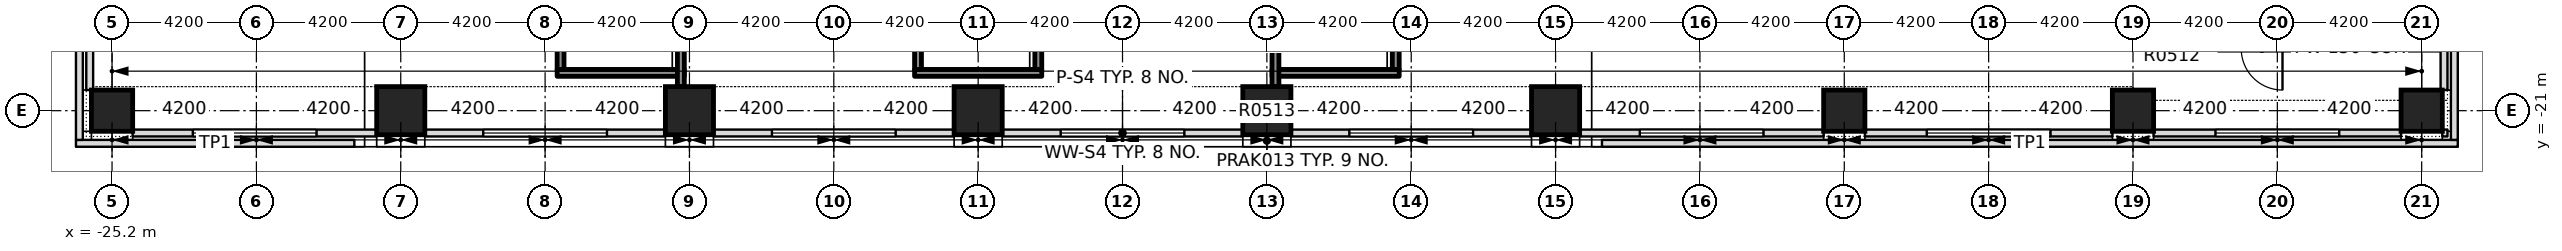
"""IFC4 building model, lengths in metres.
Left out: names, types, materials, properties, quantities, classifications, styles, units other than length and angle.
Written with IfcOpenShell. Run it as: python <this file> out.ifc"""

import sys

from ifc_helpers import new_model, si_unit, direction, frame, frame_2d, origin, origin_2d, place, context, subcontext, project, spatial, rectangle, extrude, element, fill, save


model = new_model("IFC4")
c1 = context("Model", 3, precision=1e-05, world=origin(), true_north=direction((0.0, 1.0)))
c2 = subcontext(c1, "Body", "Model", "MODEL_VIEW")
j1 = project(units=[si_unit("LENGTHUNIT", "METRE"), si_unit("PLANEANGLEUNIT", "RADIAN")], contexts=[c1])
p1 = place(None, origin())
s1 = spatial("IfcSite", under=j1, at=p1, CompositionType="ELEMENT")
p2 = place(p1, origin())
s2 = spatial("IfcBuilding", under=s1, at=p2, CompositionType="ELEMENT")
p3 = place(p2, frame((0.0, 0.0, 30.0)))
s3 = spatial("IfcBuildingStorey", under=s2, at=p3, CompositionType="ELEMENT", Elevation=30.0)
for number, where, z_axis, x_axis in (
    (1, (-16.8, -21.0, -0.4), (0.0, 0.0, 1.0), (1.0, 0.0, 0.0)),
    (2, (-8.4, -21.0, -0.4), (0.0, 0.0, 1.0), (1.0, 0.0, 0.0)),
    (3, (0.0, -21.0, -0.4), (0.0, 0.0, 1.0), (1.0, 0.0, 0.0)),
    (4, (8.4, -21.0, -0.4), (0.0, 0.0, 1.0), (1.0, 0.0, 0.0)),
    (5, (16.8, -21.0, -0.4), (0.0, 0.0, 1.0), (1.0, 0.0, 0.0)),
):
    element("IfcColumn", number, at=place(p3, frame(where, z_axis=z_axis, x_axis=x_axis)), inside=s3, PredefinedType="COLUMN", context=c2, shape_type="SweptSolid", body=[
        extrude(rectangle(XDim=1.4, YDim=1.4, at=origin_2d()), origin(), (0.0, 0.0, 1.0), 4.58),
    ])
for number, where, z_axis, x_axis in (
    (6, (-25.2, -21.0, 0.0), (0.0, 0.0, 1.0), (1.0, 0.0, 0.0)),
    (7, (25.2, -21.0, 0.0), (0.0, 0.0, 1.0), (1.0, 0.0, 0.0)),
    (8, (33.6, -21.0, 0.0), (0.0, 0.0, 1.0), (1.0, 0.0, 0.0)),
    (9, (42.0, -21.0, 0.0), (0.0, 0.0, 1.0), (1.0, 0.0, 0.0)),
):
    element("IfcColumn", number, at=place(p3, frame(where, z_axis=z_axis, x_axis=x_axis)), inside=s3, PredefinedType="COLUMN", context=c2, shape_type="SweptSolid", body=[
        extrude(rectangle(XDim=1.2, YDim=1.2, at=origin_2d()), origin(), (0.0, 0.0, 1.0), 4.18),
    ])
p4 = place(p3, frame((-26.25, -21.95, 4.5), z_axis=(0.0, 0.0, 1.0), x_axis=(1.0, 0.0, 0.0)))
e10 = element("IfcWall", 10, at=p4, inside=s3, PredefinedType="PARAPET", context=c2, shape_type="SweptSolid", body=[
    extrude(rectangle(XDim=8.1, YDim=0.2, at=frame_2d((4.05, 0.0))), origin(), (0.0, 0.0, 1.0), 1.2),
])
p5 = place(p3, frame((-26.15, -21.85, 4.5), z_axis=(0.0, 0.0, 1.0), x_axis=(0.0, 1.0, 0.0)))
e11 = element("IfcWall", 11, at=p5, inside=s3, PredefinedType="PARAPET", context=c2, shape_type="SweptSolid", body=[
    extrude(rectangle(XDim=7.9, YDim=0.2, at=frame_2d((3.95, 0.0))), origin(), (0.0, 0.0, 1.0), 1.2),
])
p6 = place(p3, frame((18.15, -21.95, 4.5), z_axis=(0.0, 0.0, 1.0), x_axis=(1.0, 0.0, 0.0)))
e12 = element("IfcWall", 12, at=p6, inside=s3, PredefinedType="PARAPET", context=c2, shape_type="SweptSolid", body=[
    extrude(rectangle(XDim=24.9, YDim=0.2, at=frame_2d((12.45, 0.0))), origin(), (0.0, 0.0, 1.0), 1.2),
])
p7 = place(p3, frame((42.95, -21.85, 4.5), z_axis=(0.0, 0.0, 1.0), x_axis=(0.0, 1.0, 0.0)))
e13 = element("IfcWall", 13, at=p7, inside=s3, PredefinedType="PARAPET", context=c2, shape_type="SweptSolid", body=[
    extrude(rectangle(XDim=52.1, YDim=0.2, at=frame_2d((26.05, 0.0))), origin(), (0.0, 0.0, 1.0), 1.2),
])
p8 = place(p3, frame((-24.6, -21.65, 0.0), z_axis=(0.0, 0.0, 1.0), x_axis=(1.0, 0.0, 0.0)))
e14 = element("IfcWall", 14, at=p8, inside=s3, PredefinedType="STANDARD", context=c2, shape_type="SweptSolid", body=[
    extrude(rectangle(XDim=7.1, YDim=0.2, at=frame_2d((3.55, 0.0))), origin(), (0.0, 0.0, 1.0), 4.18),
])
p9 = place(p8, frame((1.75, 0.0, 0.9)))
e15 = element("IfcOpeningElement", 15, at=p9, cuts=e14, PredefinedType="OPENING", context=c2, shape_type="SweptSolid", body=[
    extrude(rectangle(XDim=3.6, YDim=2.4, at=frame_2d((1.8, 1.2))), frame((0.0, 0.11, 0.0), z_axis=(0.0, -1.0, 0.0), x_axis=(1.0, 0.0, 0.0)), (0.0, 0.0, 1.0), 0.22),
])
p10 = place(p3, frame((-16.1, -21.65, 0.0), z_axis=(0.0, 0.0, 1.0), x_axis=(1.0, 0.0, 0.0)))
e16 = element("IfcWall", 16, at=p10, inside=s3, PredefinedType="STANDARD", context=c2, shape_type="SweptSolid", body=[
    extrude(rectangle(XDim=7.0, YDim=0.2, at=frame_2d((3.5, 0.0))), origin(), (0.0, 0.0, 1.0), 4.18),
])
p11 = place(p10, frame((1.7, 0.0, 0.9)))
e17 = element("IfcOpeningElement", 17, at=p11, cuts=e16, PredefinedType="OPENING", context=c2, shape_type="SweptSolid", body=[
    extrude(rectangle(XDim=3.6, YDim=2.4, at=frame_2d((1.8, 1.2))), frame((0.0, 0.11, 0.0), z_axis=(0.0, -1.0, 0.0), x_axis=(1.0, 0.0, 0.0)), (0.0, 0.0, 1.0), 0.22),
])
p12 = place(p3, frame((-7.7, -21.65, 0.0), z_axis=(0.0, 0.0, 1.0), x_axis=(1.0, 0.0, 0.0)))
e18 = element("IfcWall", 18, at=p12, inside=s3, PredefinedType="STANDARD", context=c2, shape_type="SweptSolid", body=[
    extrude(rectangle(XDim=7.0, YDim=0.2, at=frame_2d((3.5, 0.0))), origin(), (0.0, 0.0, 1.0), 4.18),
])
p13 = place(p12, frame((1.7, 0.0, 0.9)))
e19 = element("IfcOpeningElement", 19, at=p13, cuts=e18, PredefinedType="OPENING", context=c2, shape_type="SweptSolid", body=[
    extrude(rectangle(XDim=3.6, YDim=2.4, at=frame_2d((1.8, 1.2))), frame((0.0, 0.11, 0.0), z_axis=(0.0, -1.0, 0.0), x_axis=(1.0, 0.0, 0.0)), (0.0, 0.0, 1.0), 0.22),
])
p14 = place(p3, frame((0.7, -21.65, 0.0), z_axis=(0.0, 0.0, 1.0), x_axis=(1.0, 0.0, 0.0)))
e20 = element("IfcWall", 20, at=p14, inside=s3, PredefinedType="STANDARD", context=c2, shape_type="SweptSolid", body=[
    extrude(rectangle(XDim=7.0, YDim=0.2, at=frame_2d((3.5, 0.0))), origin(), (0.0, 0.0, 1.0), 4.18),
])
p15 = place(p14, frame((1.7, 0.0, 0.9)))
e21 = element("IfcOpeningElement", 21, at=p15, cuts=e20, PredefinedType="OPENING", context=c2, shape_type="SweptSolid", body=[
    extrude(rectangle(XDim=3.6, YDim=2.4, at=frame_2d((1.8, 1.2))), frame((0.0, 0.11, 0.0), z_axis=(0.0, -1.0, 0.0), x_axis=(1.0, 0.0, 0.0)), (0.0, 0.0, 1.0), 0.22),
])
p16 = place(p3, frame((9.1, -21.65, 0.0), z_axis=(0.0, 0.0, 1.0), x_axis=(1.0, 0.0, 0.0)))
e22 = element("IfcWall", 22, at=p16, inside=s3, PredefinedType="STANDARD", context=c2, shape_type="SweptSolid", body=[
    extrude(rectangle(XDim=7.0, YDim=0.2, at=frame_2d((3.5, 0.0))), origin(), (0.0, 0.0, 1.0), 4.18),
])
p17 = place(p16, frame((1.7, 0.0, 0.9)))
e23 = element("IfcOpeningElement", 23, at=p17, cuts=e22, PredefinedType="OPENING", context=c2, shape_type="SweptSolid", body=[
    extrude(rectangle(XDim=3.6, YDim=2.4, at=frame_2d((1.8, 1.2))), frame((0.0, 0.11, 0.0), z_axis=(0.0, -1.0, 0.0), x_axis=(1.0, 0.0, 0.0)), (0.0, 0.0, 1.0), 0.22),
])
p18 = place(p3, frame((17.5, -21.65, 0.0), z_axis=(0.0, 0.0, 1.0), x_axis=(1.0, 0.0, 0.0)))
e24 = element("IfcWall", 24, at=p18, inside=s3, PredefinedType="STANDARD", context=c2, shape_type="SweptSolid", body=[
    extrude(rectangle(XDim=7.1, YDim=0.2, at=frame_2d((3.55, 0.0))), origin(), (0.0, 0.0, 1.0), 4.18),
])
p19 = place(p18, frame((1.75, 0.0, 0.9)))
e25 = element("IfcOpeningElement", 25, at=p19, cuts=e24, PredefinedType="OPENING", context=c2, shape_type="SweptSolid", body=[
    extrude(rectangle(XDim=3.6, YDim=2.4, at=frame_2d((1.8, 1.2))), frame((0.0, 0.11, 0.0), z_axis=(0.0, -1.0, 0.0), x_axis=(1.0, 0.0, 0.0)), (0.0, 0.0, 1.0), 0.22),
])
p20 = place(p3, frame((25.8, -21.65, 0.0), z_axis=(0.0, 0.0, 1.0), x_axis=(1.0, 0.0, 0.0)))
e26 = element("IfcWall", 26, at=p20, inside=s3, PredefinedType="STANDARD", context=c2, shape_type="SweptSolid", body=[
    extrude(rectangle(XDim=7.2, YDim=0.2, at=frame_2d((3.6, 0.0))), origin(), (0.0, 0.0, 1.0), 4.18),
])
p21 = place(p20, frame((1.8, 0.0, 0.9)))
e27 = element("IfcOpeningElement", 27, at=p21, cuts=e26, PredefinedType="OPENING", context=c2, shape_type="SweptSolid", body=[
    extrude(rectangle(XDim=3.6, YDim=2.4, at=frame_2d((1.8, 1.2))), frame((0.0, 0.11, 0.0), z_axis=(0.0, -1.0, 0.0), x_axis=(1.0, 0.0, 0.0)), (0.0, 0.0, 1.0), 0.22),
])
p22 = place(p3, frame((34.2, -21.65, 0.0), z_axis=(0.0, 0.0, 1.0), x_axis=(1.0, 0.0, 0.0)))
e28 = element("IfcWall", 28, at=p22, inside=s3, PredefinedType="STANDARD", context=c2, shape_type="SweptSolid", body=[
    extrude(rectangle(XDim=7.2, YDim=0.2, at=frame_2d((3.6, 0.0))), origin(), (0.0, 0.0, 1.0), 4.18),
])
p23 = place(p22, frame((1.8, 0.0, 0.9)))
e29 = element("IfcOpeningElement", 29, at=p23, cuts=e28, PredefinedType="OPENING", context=c2, shape_type="SweptSolid", body=[
    extrude(rectangle(XDim=3.6, YDim=2.4, at=frame_2d((1.8, 1.2))), frame((0.0, 0.11, 0.0), z_axis=(0.0, -1.0, 0.0), x_axis=(1.0, 0.0, 0.0)), (0.0, 0.0, 1.0), 0.22),
])
p24 = place(p3, frame((42.6, -21.65, 0.0), z_axis=(0.0, 0.0, 1.0), x_axis=(1.0, 0.0, 0.0)))
e30 = element("IfcWall", 30, at=p24, inside=s3, PredefinedType="STANDARD", context=c2, shape_type="SweptSolid", body=[
    extrude(rectangle(XDim=0.15, YDim=0.2, at=frame_2d((0.075, 0.0))), origin(), (0.0, 0.0, 1.0), 4.18),
])
p25 = place(p3, frame((42.65, -20.4, 0.0), z_axis=(0.0, 0.0, 1.0), x_axis=(0.0, 1.0, 0.0)))
e31 = element("IfcWall", 31, at=p25, inside=s3, PredefinedType="STANDARD", context=c2, shape_type="SweptSolid", body=[
    extrude(rectangle(XDim=7.2, YDim=0.2, at=frame_2d((3.6, 0.0))), origin(), (0.0, 0.0, 1.0), 4.18),
])
p26 = place(p25, frame((1.8, 0.0, 0.9)))
e32 = element("IfcOpeningElement", 32, at=p26, cuts=e31, PredefinedType="OPENING", context=c2, shape_type="SweptSolid", body=[
    extrude(rectangle(XDim=3.6, YDim=2.4, at=frame_2d((1.8, 1.2))), frame((0.0, 0.11, 0.0), z_axis=(0.0, -1.0, 0.0), x_axis=(1.0, 0.0, 0.0)), (0.0, 0.0, 1.0), 0.22),
])
p27 = place(p3, frame((-25.85, -13.3, 0.0), z_axis=(0.0, 0.0, 1.0), x_axis=(0.0, -1.0, 0.0)))
e33 = element("IfcWall", 33, at=p27, inside=s3, PredefinedType="STANDARD", context=c2, shape_type="SweptSolid", body=[
    extrude(rectangle(XDim=7.1, YDim=0.2, at=frame_2d((3.55, 0.0))), origin(), (0.0, 0.0, 1.0), 4.18),
])
p28 = place(p27, frame((1.75, 0.0, 0.9)))
e34 = element("IfcOpeningElement", 34, at=p28, cuts=e33, PredefinedType="OPENING", context=c2, shape_type="SweptSolid", body=[
    extrude(rectangle(XDim=3.6, YDim=2.4, at=frame_2d((1.8, 1.2))), frame((0.0, 0.11, 0.0), z_axis=(0.0, -1.0, 0.0), x_axis=(1.0, 0.0, 0.0)), (0.0, 0.0, 1.0), 0.22),
])
p29 = place(p3, frame((-12.25, -19.9, 0.0), z_axis=(0.0, 0.0, 1.0), x_axis=(1.0, 0.0, 0.0)))
e35 = element("IfcWall", 35, at=p29, inside=s3, PredefinedType="SOLIDWALL", context=c2, shape_type="SweptSolid", body=[
    extrude(rectangle(XDim=3.7, YDim=0.2, at=frame_2d((1.85, 0.0))), origin(), (0.0, 0.0, 1.0), 4.18),
])
p30 = place(p3, frame((-12.15, -19.8, 0.0), z_axis=(0.0, 0.0, 1.0), x_axis=(0.0, 1.0, 0.0)))
e36 = element("IfcWall", 36, at=p30, inside=s3, PredefinedType="SOLIDWALL", context=c2, shape_type="SweptSolid", body=[
    extrude(rectangle(XDim=6.6, YDim=0.2, at=frame_2d((3.3, 0.0))), origin(), (0.0, 0.0, 1.0), 4.18),
])
p31 = place(p3, frame((-8.65, -20.3, 0.0), z_axis=(0.0, 0.0, 1.0), x_axis=(0.0, 1.0, 0.0)))
e37 = element("IfcWall", 37, at=p31, inside=s3, PredefinedType="SOLIDWALL", context=c2, shape_type="SweptSolid", body=[
    extrude(rectangle(XDim=7.1, YDim=0.2, at=frame_2d((3.55, 0.0))), origin(), (0.0, 0.0, 1.0), 4.18),
])
p32 = place(p3, frame((-1.85, -19.9, 0.0), z_axis=(0.0, 0.0, 1.0), x_axis=(1.0, 0.0, 0.0)))
e38 = element("IfcWall", 38, at=p32, inside=s3, PredefinedType="SOLIDWALL", context=c2, shape_type="SweptSolid", body=[
    extrude(rectangle(XDim=3.7, YDim=0.2, at=frame_2d((1.85, 0.0))), origin(), (0.0, 0.0, 1.0), 4.18),
])
for number, where, z_axis, x_axis in (
    (39, (-1.75, -19.8, 0.0), (0.0, 0.0, 1.0), (0.0, 1.0, 0.0)),
    (40, (1.75, -19.8, 0.0), (0.0, 0.0, 1.0), (0.0, 1.0, 0.0)),
):
    element("IfcWall", number, at=place(p3, frame(where, z_axis=z_axis, x_axis=x_axis)), inside=s3, PredefinedType="SOLIDWALL", context=c2, shape_type="SweptSolid", body=[
        extrude(rectangle(XDim=6.6, YDim=0.2, at=frame_2d((3.3, 0.0))), origin(), (0.0, 0.0, 1.0), 4.18),
    ])
p33 = place(p3, frame((8.55, -19.9, 0.0), z_axis=(0.0, 0.0, 1.0), x_axis=(1.0, 0.0, 0.0)))
e41 = element("IfcWall", 41, at=p33, inside=s3, PredefinedType="SOLIDWALL", context=c2, shape_type="SweptSolid", body=[
    extrude(rectangle(XDim=3.7, YDim=0.2, at=frame_2d((1.85, 0.0))), origin(), (0.0, 0.0, 1.0), 4.18),
])
p34 = place(p3, frame((8.65, -20.3, 0.0), z_axis=(0.0, 0.0, 1.0), x_axis=(0.0, 1.0, 0.0)))
e42 = element("IfcWall", 42, at=p34, inside=s3, PredefinedType="SOLIDWALL", context=c2, shape_type="SweptSolid", body=[
    extrude(rectangle(XDim=7.1, YDim=0.2, at=frame_2d((3.55, 0.0))), origin(), (0.0, 0.0, 1.0), 4.18),
])
p35 = place(p3, frame((12.15, -19.8, 0.0), z_axis=(0.0, 0.0, 1.0), x_axis=(0.0, 1.0, 0.0)))
e43 = element("IfcWall", 43, at=p35, inside=s3, PredefinedType="SOLIDWALL", context=c2, shape_type="SweptSolid", body=[
    extrude(rectangle(XDim=6.6, YDim=0.2, at=frame_2d((3.3, 0.0))), origin(), (0.0, 0.0, 1.0), 4.18),
])
p36 = place(p9, origin())
e44 = element("IfcWindow", 44, at=p36, inside=s3, PartitioningType="SINGLE_PANEL", PredefinedType="WINDOW", context=c2, shape_type="SweptSolid", body=[
    extrude(rectangle(XDim=3.6, YDim=2.4, at=frame_2d((1.8, 1.2))), frame((0.0, 0.03, 0.0), z_axis=(0.0, -1.0, 0.0), x_axis=(1.0, 0.0, 0.0)), (0.0, 0.0, 1.0), 0.06),
])
fill(e15, e44)
p37 = place(p11, origin())
e45 = element("IfcWindow", 45, at=p37, inside=s3, PartitioningType="SINGLE_PANEL", PredefinedType="WINDOW", context=c2, shape_type="SweptSolid", body=[
    extrude(rectangle(XDim=3.6, YDim=2.4, at=frame_2d((1.8, 1.2))), frame((0.0, 0.03, 0.0), z_axis=(0.0, -1.0, 0.0), x_axis=(1.0, 0.0, 0.0)), (0.0, 0.0, 1.0), 0.06),
])
fill(e17, e45)
p38 = place(p13, origin())
e46 = element("IfcWindow", 46, at=p38, inside=s3, PartitioningType="SINGLE_PANEL", PredefinedType="WINDOW", context=c2, shape_type="SweptSolid", body=[
    extrude(rectangle(XDim=3.6, YDim=2.4, at=frame_2d((1.8, 1.2))), frame((0.0, 0.03, 0.0), z_axis=(0.0, -1.0, 0.0), x_axis=(1.0, 0.0, 0.0)), (0.0, 0.0, 1.0), 0.06),
])
fill(e19, e46)
p39 = place(p15, origin())
e47 = element("IfcWindow", 47, at=p39, inside=s3, PartitioningType="SINGLE_PANEL", PredefinedType="WINDOW", context=c2, shape_type="SweptSolid", body=[
    extrude(rectangle(XDim=3.6, YDim=2.4, at=frame_2d((1.8, 1.2))), frame((0.0, 0.03, 0.0), z_axis=(0.0, -1.0, 0.0), x_axis=(1.0, 0.0, 0.0)), (0.0, 0.0, 1.0), 0.06),
])
fill(e21, e47)
p40 = place(p17, origin())
e48 = element("IfcWindow", 48, at=p40, inside=s3, PartitioningType="SINGLE_PANEL", PredefinedType="WINDOW", context=c2, shape_type="SweptSolid", body=[
    extrude(rectangle(XDim=3.6, YDim=2.4, at=frame_2d((1.8, 1.2))), frame((0.0, 0.03, 0.0), z_axis=(0.0, -1.0, 0.0), x_axis=(1.0, 0.0, 0.0)), (0.0, 0.0, 1.0), 0.06),
])
fill(e23, e48)
p41 = place(p19, origin())
e49 = element("IfcWindow", 49, at=p41, inside=s3, PartitioningType="SINGLE_PANEL", PredefinedType="WINDOW", context=c2, shape_type="SweptSolid", body=[
    extrude(rectangle(XDim=3.6, YDim=2.4, at=frame_2d((1.8, 1.2))), frame((0.0, 0.03, 0.0), z_axis=(0.0, -1.0, 0.0), x_axis=(1.0, 0.0, 0.0)), (0.0, 0.0, 1.0), 0.06),
])
fill(e25, e49)
p42 = place(p21, origin())
e50 = element("IfcWindow", 50, at=p42, inside=s3, PartitioningType="SINGLE_PANEL", PredefinedType="WINDOW", context=c2, shape_type="SweptSolid", body=[
    extrude(rectangle(XDim=3.6, YDim=2.4, at=frame_2d((1.8, 1.2))), frame((0.0, 0.03, 0.0), z_axis=(0.0, -1.0, 0.0), x_axis=(1.0, 0.0, 0.0)), (0.0, 0.0, 1.0), 0.06),
])
fill(e27, e50)
p43 = place(p23, origin())
e51 = element("IfcWindow", 51, at=p43, inside=s3, PartitioningType="SINGLE_PANEL", PredefinedType="WINDOW", context=c2, shape_type="SweptSolid", body=[
    extrude(rectangle(XDim=3.6, YDim=2.4, at=frame_2d((1.8, 1.2))), frame((0.0, 0.03, 0.0), z_axis=(0.0, -1.0, 0.0), x_axis=(1.0, 0.0, 0.0)), (0.0, 0.0, 1.0), 0.06),
])
fill(e29, e51)
save(model, sys.argv[1])
